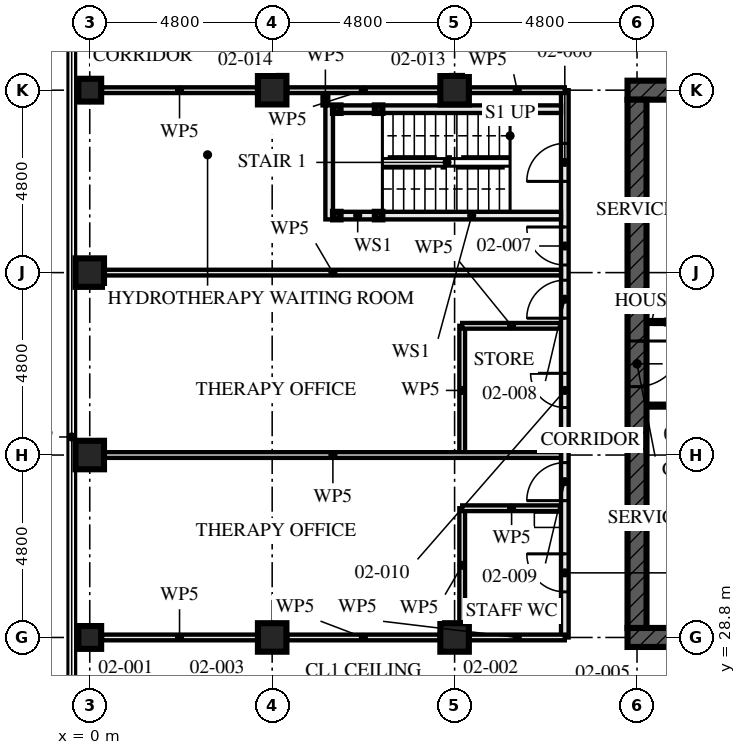
"""IFC4 building model, lengths in metres.
Left out: names, types, materials, properties, quantities, classifications, styles, units other than length and angle.
Written with IfcOpenShell. Run it as: python <this file> out.ifc"""

import sys

from ifc_helpers import new_model, si_unit, direction, frame, frame_2d, origin, origin_2d, place, context, subcontext, project, spatial, rectangle, hollow_rectangle, extrude, element, fill, save


model = new_model("IFC4")
c1 = context("Model", 3, precision=1e-05, world=origin(), true_north=direction((0.0, 1.0)))
c2 = subcontext(c1, "Body", "Model", "MODEL_VIEW")
j1 = project(units=[si_unit("LENGTHUNIT", "METRE"), si_unit("PLANEANGLEUNIT", "RADIAN")], contexts=[c1])
p1 = place(None, origin())
s1 = spatial("IfcSite", under=j1, at=p1, CompositionType="ELEMENT")
p2 = place(p1, origin())
s2 = spatial("IfcBuilding", under=s1, at=p2, CompositionType="ELEMENT")
p3 = place(p2, frame((0.0, 0.0, 9.0)))
s3 = spatial("IfcBuildingStorey", under=s2, at=p3, CompositionType="ELEMENT", Elevation=9.0)
p4 = place(p3, frame((0.0, 28.8, 0.0), z_axis=(0.0, 0.0, 1.0), x_axis=(0.0, 1.0, 0.0)))
e1 = element("IfcColumn", 1, at=p4, inside=s3, PredefinedType="COLUMN", context=c2, shape_type="SweptSolid", body=[
    extrude(hollow_rectangle(XDim=0.6, YDim=0.6, WallThickness=0.08, at=origin_2d()), origin(), (0.0, 0.0, 1.0), 4.5),
])
for number, where, z_axis, x_axis in (
    (2, (0.0, 33.6, 0.0), (0.0, 0.0, 1.0), (1.0, 0.0, 0.0)),
    (3, (0.0, 38.4, 0.0), (0.0, 0.0, 1.0), (1.0, 0.0, 0.0)),
):
    element("IfcColumn", number, at=place(p3, frame(where, z_axis=z_axis, x_axis=x_axis)), inside=s3, PredefinedType="COLUMN", context=c2, shape_type="SweptSolid", body=[
        extrude(hollow_rectangle(XDim=0.75, YDim=0.75, WallThickness=0.08, at=origin_2d()), origin(), (0.0, 0.0, 1.0), 4.5),
    ])
p5 = place(p3, frame((0.0, 43.2, 0.0), z_axis=(0.0, 0.0, 1.0), x_axis=(0.0, 1.0, 0.0)))
e4 = element("IfcColumn", 4, at=p5, inside=s3, PredefinedType="COLUMN", context=c2, shape_type="SweptSolid", body=[
    extrude(hollow_rectangle(XDim=0.6, YDim=0.6, WallThickness=0.08, at=origin_2d()), origin(), (0.0, 0.0, 1.0), 4.5),
])
for number, where, z_axis, x_axis in (
    (5, (4.8, 28.8, 0.0), (0.0, 0.0, 1.0), (0.0, 1.0, 0.0)),
    (6, (4.8, 43.2, 0.0), (0.0, 0.0, 1.0), (0.0, 1.0, 0.0)),
    (7, (9.6, 28.8, 0.0), (0.0, 0.0, 1.0), (0.0, 1.0, 0.0)),
    (8, (9.6, 43.2, 0.0), (0.0, 0.0, 1.0), (0.0, 1.0, 0.0)),
):
    element("IfcColumn", number, at=place(p3, frame(where, z_axis=z_axis, x_axis=x_axis)), inside=s3, PredefinedType="COLUMN", context=c2, shape_type="SweptSolid", body=[
        extrude(hollow_rectangle(XDim=0.75, YDim=0.75, WallThickness=0.08, at=origin_2d()), origin(), (0.0, 0.0, 1.0), 4.5),
    ])
p6 = place(p3, frame((14.15, 28.8, -0.17), z_axis=(0.0, 0.0, 1.0), x_axis=(1.0, 0.0, 0.0)))
e9 = element("IfcWall", 9, at=p6, inside=s3, PredefinedType="SHEAR", context=c2, shape_type="SweptSolid", body=[
    extrude(rectangle(XDim=14.9, YDim=0.5, at=frame_2d((7.45, 0.0))), origin(), (0.0, 0.0, 1.0), 4.5),
])
p7 = place(p6, frame((6.85, 0.0, 0.17)))
e10 = element("IfcOpeningElement", 10, at=p7, cuts=e9, PredefinedType="OPENING", context=c2, shape_type="SweptSolid", body=[
    extrude(rectangle(XDim=1.2, YDim=2.1, at=frame_2d((0.6, 1.05))), frame((0.0, 0.26, 0.0), z_axis=(0.0, -1.0, 0.0), x_axis=(1.0, 0.0, 0.0)), (0.0, 0.0, 1.0), 0.521),
])
p8 = place(p3, frame((29.05, 43.2, -0.17), z_axis=(0.0, 0.0, 1.0), x_axis=(-1.0, 0.0, 0.0)))
e11 = element("IfcWall", 11, at=p8, inside=s3, PredefinedType="SHEAR", context=c2, shape_type="SweptSolid", body=[
    extrude(rectangle(XDim=14.9, YDim=0.5, at=frame_2d((7.45, 0.0))), origin(), (0.0, 0.0, 1.0), 4.5),
])
p9 = place(p8, frame((6.85, 0.0, 0.17)))
e12 = element("IfcOpeningElement", 12, at=p9, cuts=e11, PredefinedType="OPENING", context=c2, shape_type="SweptSolid", body=[
    extrude(rectangle(XDim=1.2, YDim=2.1, at=frame_2d((0.6, 1.05))), frame((0.0, 0.26, 0.0), z_axis=(0.0, -1.0, 0.0), x_axis=(1.0, 0.0, 0.0)), (0.0, 0.0, 1.0), 0.521),
])
p10 = place(p3, frame((14.4, 42.95, -0.17), z_axis=(0.0, 0.0, 1.0), x_axis=(0.0, -1.0, 0.0)))
e13 = element("IfcWall", 13, at=p10, inside=s3, PredefinedType="SHEAR", context=c2, shape_type="SweptSolid", body=[
    extrude(rectangle(XDim=13.9, YDim=0.5, at=frame_2d((6.95, 0.0))), origin(), (0.0, 0.0, 1.0), 4.5),
])
p11 = place(p10, frame((6.35, 0.0, 0.17)))
e14 = element("IfcOpeningElement", 14, at=p11, cuts=e13, PredefinedType="OPENING", context=c2, shape_type="SweptSolid", body=[
    extrude(rectangle(XDim=1.2, YDim=2.1, at=frame_2d((0.6, 1.05))), frame((0.0, 0.26, 0.0), z_axis=(0.0, -1.0, 0.0), x_axis=(1.0, 0.0, 0.0)), (0.0, 0.0, 1.0), 0.521),
])
for number, where, z_axis, x_axis in (
    (15, (6.5, 42.7, 0.0), (0.0, 0.0, 1.0), (1.0, 0.0, 0.0)),
    (16, (6.5, 39.9, 0.0), (0.0, 0.0, 1.0), (1.0, 0.0, 0.0)),
    (17, (7.6, 42.7, 0.0), (0.0, 0.0, 1.0), (1.0, 0.0, 0.0)),
    (18, (7.6, 39.9, 0.0), (0.0, 0.0, 1.0), (1.0, 0.0, 0.0)),
):
    element("IfcColumn", number, at=place(p3, frame(where, z_axis=z_axis, x_axis=x_axis)), inside=s3, PredefinedType="COLUMN", context=c2, shape_type="SweptSolid", body=[
        extrude(hollow_rectangle(XDim=0.2, YDim=0.2, WallThickness=0.008, at=origin_2d()), origin(), (0.0, 0.0, 1.0), 4.33),
    ])
p12 = place(p3, frame((6.6, 42.7, 0.0), z_axis=(0.0, 0.0, 1.0), x_axis=(1.0, 0.0, 0.0)))
e19 = element("IfcWall", 19, at=p12, inside=s3, PredefinedType="SOLIDWALL", context=c2, shape_type="SweptSolid", body=[
    extrude(rectangle(XDim=0.9, YDim=0.2, at=frame_2d((0.45, 0.0))), origin(), (0.0, 0.0, 1.0), 3.99),
])
p13 = place(p3, frame((7.7, 42.7, 0.0), z_axis=(0.0, 0.0, 1.0), x_axis=(1.0, 0.0, 0.0)))
e20 = element("IfcWall", 20, at=p13, inside=s3, PredefinedType="SOLIDWALL", context=c2, shape_type="SweptSolid", body=[
    extrude(rectangle(XDim=4.7, YDim=0.2, at=frame_2d((2.35, 0.0))), origin(), (0.0, 0.0, 1.0), 3.99),
])
p14 = place(p3, frame((6.6, 39.9, 0.0), z_axis=(0.0, 0.0, 1.0), x_axis=(1.0, 0.0, 0.0)))
e21 = element("IfcWall", 21, at=p14, inside=s3, PredefinedType="SOLIDWALL", context=c2, shape_type="SweptSolid", body=[
    extrude(rectangle(XDim=0.9, YDim=0.2, at=frame_2d((0.45, 0.0))), origin(), (0.0, 0.0, 1.0), 3.99),
])
p15 = place(p3, frame((7.7, 39.9, 0.0), z_axis=(0.0, 0.0, 1.0), x_axis=(1.0, 0.0, 0.0)))
e22 = element("IfcWall", 22, at=p15, inside=s3, PredefinedType="SOLIDWALL", context=c2, shape_type="SweptSolid", body=[
    extrude(rectangle(XDim=4.7, YDim=0.2, at=frame_2d((2.35, 0.0))), origin(), (0.0, 0.0, 1.0), 3.99),
])
p16 = place(p3, frame((6.3, 42.8, 0.0), z_axis=(0.0, 0.0, 1.0), x_axis=(0.0, -1.0, 0.0)))
e23 = element("IfcWall", 23, at=p16, inside=s3, PredefinedType="SOLIDWALL", context=c2, shape_type="SweptSolid", body=[
    extrude(rectangle(XDim=3.0, YDim=0.2, at=frame_2d((1.5, 0.0))), origin(), (0.0, 0.0, 1.0), 4.33),
])
p17 = place(p3, frame((9.8, 37.0, 0.0), z_axis=(0.0, 0.0, 1.0), x_axis=(1.0, 0.0, 0.0)))
e24 = element("IfcWall", 24, at=p17, inside=s3, PredefinedType="PARTITIONING", context=c2, shape_type="SweptSolid", body=[
    extrude(rectangle(XDim=2.6, YDim=0.15, at=frame_2d((1.3, 0.0))), origin(), (0.0, 0.0, 1.0), 4.33),
])
p18 = place(p3, frame((9.8, 37.0, 0.0), z_axis=(0.0, 0.0, 1.0), x_axis=(0.0, -1.0, 0.0)))
e25 = element("IfcWall", 25, at=p18, inside=s3, PredefinedType="PARTITIONING", context=c2, shape_type="SweptSolid", body=[
    extrude(rectangle(XDim=3.4, YDim=0.15, at=frame_2d((1.7, 0.0))), origin(), (0.0, 0.0, 1.0), 4.33),
])
p19 = place(p3, frame((9.8, 32.2, 0.0), z_axis=(0.0, 0.0, 1.0), x_axis=(1.0, 0.0, 0.0)))
e26 = element("IfcWall", 26, at=p19, inside=s3, PredefinedType="PARTITIONING", context=c2, shape_type="SweptSolid", body=[
    extrude(rectangle(XDim=2.6, YDim=0.15, at=frame_2d((1.3, 0.0))), origin(), (0.0, 0.0, 1.0), 4.33),
])
p20 = place(p3, frame((9.8, 32.2, 0.0), z_axis=(0.0, 0.0, 1.0), x_axis=(0.0, -1.0, 0.0)))
e27 = element("IfcWall", 27, at=p20, inside=s3, PredefinedType="PARTITIONING", context=c2, shape_type="SweptSolid", body=[
    extrude(rectangle(XDim=3.005, YDim=0.15, at=frame_2d((1.502, 0.0))), origin(), (0.0, 0.0, 1.0), 4.33),
])
for number, where, z_axis, x_axis in (
    (28, (0.395, 38.4, 0.0), (0.0, 0.0, 1.0), (1.0, 0.0, 0.0)),
    (29, (0.395, 33.6, 0.0), (0.0, 0.0, 1.0), (1.0, 0.0, 0.0)),
):
    element("IfcWall", number, at=place(p3, frame(where, z_axis=z_axis, x_axis=x_axis)), inside=s3, PredefinedType="PARTITIONING", context=c2, shape_type="SweptSolid", body=[
        extrude(rectangle(XDim=12.005, YDim=0.15, at=frame_2d((6.002, 0.0))), origin(), (0.0, 0.0, 1.0), 3.55),
    ])
p21 = place(p3, frame((6.2, 43.2, 0.0), z_axis=(0.0, 0.0, 1.0), x_axis=(0.0, -1.0, 0.0)))
e30 = element("IfcWall", 30, at=p21, inside=s3, PredefinedType="PARTITIONING", context=c2, shape_type="SweptSolid", body=[
    extrude(rectangle(XDim=0.4, YDim=0.15, at=frame_2d((0.2, 0.0))), origin(), (0.0, 0.0, 1.0), 4.33),
])
p22 = place(p3, frame((12.5, 43.2, 0.0), z_axis=(0.0, 0.0, 1.0), x_axis=(0.0, -1.0, 0.0)))
e31 = element("IfcWall", 31, at=p22, inside=s3, PredefinedType="PARTITIONING", context=c2, shape_type="SweptSolid", body=[
    extrude(rectangle(XDim=14.4, YDim=0.2, at=frame_2d((7.2, 0.0))), origin(), (0.0, 0.0, 1.0), 3.55),
])
p23 = place(p22, frame((1.4, 0.0, 0.0)))
e32 = element("IfcOpeningElement", 32, at=p23, cuts=e31, PredefinedType="OPENING", context=c2, shape_type="SweptSolid", body=[
    extrude(rectangle(XDim=1.0, YDim=2.1, at=frame_2d((0.5, 1.05))), frame((0.0, 0.111, 0.0), z_axis=(0.0, -1.0, 0.0), x_axis=(1.0, 0.0, 0.0)), (0.0, 0.0, 1.0), 0.221),
])
p24 = place(p22, frame((3.6, 0.0, 0.0)))
e33 = element("IfcOpeningElement", 33, at=p24, cuts=e31, PredefinedType="OPENING", context=c2, shape_type="SweptSolid", body=[
    extrude(rectangle(XDim=1.0, YDim=2.4, at=frame_2d((0.5, 1.2))), frame((0.0, 0.111, 0.0), z_axis=(0.0, -1.0, 0.0), x_axis=(1.0, 0.0, 0.0)), (0.0, 0.0, 1.0), 0.221),
])
p25 = place(p22, frame((5.0, 0.0, 0.0)))
e34 = element("IfcOpeningElement", 34, at=p25, cuts=e31, PredefinedType="OPENING", context=c2, shape_type="SweptSolid", body=[
    extrude(rectangle(XDim=1.0, YDim=2.4, at=frame_2d((0.5, 1.2))), frame((0.0, 0.111, 0.0), z_axis=(0.0, -1.0, 0.0), x_axis=(1.0, 0.0, 0.0)), (0.0, 0.0, 1.0), 0.221),
])
p26 = place(p22, frame((9.8, 0.0, 0.0)))
e35 = element("IfcOpeningElement", 35, at=p26, cuts=e31, PredefinedType="OPENING", context=c2, shape_type="SweptSolid", body=[
    extrude(rectangle(XDim=1.0, YDim=2.4, at=frame_2d((0.5, 1.2))), frame((0.0, 0.111, 0.0), z_axis=(0.0, -1.0, 0.0), x_axis=(1.0, 0.0, 0.0)), (0.0, 0.0, 1.0), 0.221),
])
p27 = place(p22, frame((7.45, 0.0, 0.0)))
e36 = element("IfcOpeningElement", 36, at=p27, cuts=e31, PredefinedType="OPENING", context=c2, shape_type="SweptSolid", body=[
    extrude(rectangle(XDim=0.9, YDim=2.1, at=frame_2d((0.45, 1.05))), frame((0.0, 0.111, 0.0), z_axis=(0.0, -1.0, 0.0), x_axis=(1.0, 0.0, 0.0)), (0.0, 0.0, 1.0), 0.221),
])
p28 = place(p22, frame((12.2, 0.0, 0.0)))
e37 = element("IfcOpeningElement", 37, at=p28, cuts=e31, PredefinedType="OPENING", context=c2, shape_type="SweptSolid", body=[
    extrude(rectangle(XDim=1.0, YDim=2.1, at=frame_2d((0.5, 1.05))), frame((0.0, 0.111, 0.0), z_axis=(0.0, -1.0, 0.0), x_axis=(1.0, 0.0, 0.0)), (0.0, 0.0, 1.0), 0.221),
])
p29 = place(p3, frame((14.65, 34.9, 0.0), z_axis=(0.0, 0.0, 1.0), x_axis=(1.0, 0.0, 0.0)))
e38 = element("IfcWall", 38, at=p29, inside=s3, PredefinedType="SOLIDWALL", context=c2, shape_type="SweptSolid", body=[
    extrude(rectangle(XDim=5.9, YDim=0.1, at=frame_2d((2.95, 0.0))), origin(), (0.0, 0.0, 1.0), 4.33),
])
p30 = place(p29, frame((1.6, 0.0, 0.0)))
e39 = element("IfcOpeningElement", 39, at=p30, cuts=e38, PredefinedType="OPENING", context=c2, shape_type="SweptSolid", body=[
    extrude(rectangle(XDim=0.7, YDim=2.1, at=frame_2d((0.35, 1.05))), frame((0.0, 0.061, 0.0), z_axis=(0.0, -1.0, 0.0), x_axis=(1.0, 0.0, 0.0)), (0.0, 0.0, 1.0), 0.121),
])
p31 = place(p3, frame((14.65, 37.1, 0.0), z_axis=(0.0, 0.0, 1.0), x_axis=(1.0, 0.0, 0.0)))
e40 = element("IfcWall", 40, at=p31, inside=s3, PredefinedType="SOLIDWALL", context=c2, shape_type="SweptSolid", body=[
    extrude(rectangle(XDim=5.9, YDim=0.1, at=frame_2d((2.95, 0.0))), origin(), (0.0, 0.0, 1.0), 4.33),
])
p32 = place(p31, frame((0.15, 0.0, 0.0)))
e41 = element("IfcOpeningElement", 41, at=p32, cuts=e40, PredefinedType="OPENING", context=c2, shape_type="SweptSolid", body=[
    extrude(rectangle(XDim=0.7, YDim=2.1, at=frame_2d((0.35, 1.05))), frame((0.0, 0.061, 0.0), z_axis=(0.0, -1.0, 0.0), x_axis=(1.0, 0.0, 0.0)), (0.0, 0.0, 1.0), 0.121),
])
p33 = place(p31, frame((1.5, 0.0, 0.0)))
e42 = element("IfcOpeningElement", 42, at=p33, cuts=e40, PredefinedType="OPENING", context=c2, shape_type="SweptSolid", body=[
    extrude(rectangle(XDim=0.9, YDim=2.1, at=frame_2d((0.45, 1.05))), frame((0.0, 0.061, 0.0), z_axis=(0.0, -1.0, 0.0), x_axis=(1.0, 0.0, 0.0)), (0.0, 0.0, 1.0), 0.121),
])
p34 = place(p3, frame((12.5, 28.8, 0.0), z_axis=(0.0, 0.0, 1.0), x_axis=(-1.0, 0.0, 0.0)))
e43 = element("IfcWall", 43, at=p34, inside=s3, PredefinedType="PARTITIONING", context=c2, shape_type="SweptSolid", body=[
    extrude(rectangle(XDim=2.505, YDim=0.15, at=frame_2d((1.252, 0.0))), origin(), (0.0, 0.0, 1.0), 3.32),
])
p35 = place(p3, frame((9.205, 28.8, 0.0), z_axis=(0.0, 0.0, 1.0), x_axis=(-1.0, 0.0, 0.0)))
e44 = element("IfcWall", 44, at=p35, inside=s3, PredefinedType="PARTITIONING", context=c2, shape_type="SweptSolid", body=[
    extrude(rectangle(XDim=4.01, YDim=0.15, at=frame_2d((2.005, 0.0))), origin(), (0.0, 0.0, 1.0), 3.32),
])
p36 = place(p3, frame((4.405, 28.8, 0.0), z_axis=(0.0, 0.0, 1.0), x_axis=(-1.0, 0.0, 0.0)))
e45 = element("IfcWall", 45, at=p36, inside=s3, PredefinedType="PARTITIONING", context=c2, shape_type="SweptSolid", body=[
    extrude(rectangle(XDim=4.085, YDim=0.15, at=frame_2d((2.042, 0.0))), origin(), (0.0, 0.0, 1.0), 3.32),
])
p37 = place(p3, frame((12.5, 43.2, 0.0), z_axis=(0.0, 0.0, 1.0), x_axis=(-1.0, 0.0, 0.0)))
e46 = element("IfcWall", 46, at=p37, inside=s3, PredefinedType="PARTITIONING", context=c2, shape_type="SweptSolid", body=[
    extrude(rectangle(XDim=2.505, YDim=0.15, at=frame_2d((1.252, 0.0))), origin(), (0.0, 0.0, 1.0), 3.32),
])
p38 = place(p3, frame((9.205, 43.2, 0.0), z_axis=(0.0, 0.0, 1.0), x_axis=(-1.0, 0.0, 0.0)))
e47 = element("IfcWall", 47, at=p38, inside=s3, PredefinedType="PARTITIONING", context=c2, shape_type="SweptSolid", body=[
    extrude(rectangle(XDim=4.01, YDim=0.15, at=frame_2d((2.005, 0.0))), origin(), (0.0, 0.0, 1.0), 3.32),
])
p39 = place(p3, frame((4.405, 43.2, 0.0), z_axis=(0.0, 0.0, 1.0), x_axis=(-1.0, 0.0, 0.0)))
e48 = element("IfcWall", 48, at=p39, inside=s3, PredefinedType="PARTITIONING", context=c2, shape_type="SweptSolid", body=[
    extrude(rectangle(XDim=4.085, YDim=0.15, at=frame_2d((2.042, 0.0))), origin(), (0.0, 0.0, 1.0), 3.32),
])
p40 = place(p23, frame((1.0, 0.0, 0.0), z_axis=(0.0, 0.0, 1.0), x_axis=(-1.0, 0.0, 0.0)))
e49 = element("IfcDoor", 49, at=p40, inside=s3, OperationType="SINGLE_SWING_RIGHT", PredefinedType="DOOR", context=c2, shape_type="SweptSolid", body=[
    extrude(rectangle(XDim=1.0, YDim=2.1, at=frame_2d((0.5, 1.05))), frame((0.0, 0.032, 0.0), z_axis=(0.0, -1.0, 0.0), x_axis=(1.0, 0.0, 0.0)), (0.0, 0.0, 1.0), 0.064),
])
fill(e32, e49)
p41 = place(p24, frame((1.0, 0.0, 0.0), z_axis=(0.0, 0.0, 1.0), x_axis=(-1.0, 0.0, 0.0)))
e50 = element("IfcDoor", 50, at=p41, inside=s3, OperationType="SINGLE_SWING_LEFT", PredefinedType="DOOR", context=c2, shape_type="SweptSolid", body=[
    extrude(rectangle(XDim=1.0, YDim=2.4, at=frame_2d((0.5, 1.2))), frame((0.0, 0.027, 0.0), z_axis=(0.0, -1.0, 0.0), x_axis=(1.0, 0.0, 0.0)), (0.0, 0.0, 1.0), 0.054),
])
fill(e33, e50)
p42 = place(p25, frame((1.0, 0.0, 0.0), z_axis=(0.0, 0.0, 1.0), x_axis=(-1.0, 0.0, 0.0)))
e51 = element("IfcDoor", 51, at=p42, inside=s3, OperationType="SINGLE_SWING_RIGHT", PredefinedType="DOOR", context=c2, shape_type="SweptSolid", body=[
    extrude(rectangle(XDim=1.0, YDim=2.4, at=frame_2d((0.5, 1.2))), frame((0.0, 0.027, 0.0), z_axis=(0.0, -1.0, 0.0), x_axis=(1.0, 0.0, 0.0)), (0.0, 0.0, 1.0), 0.054),
])
fill(e34, e51)
p43 = place(p26, frame((1.0, 0.0, 0.0), z_axis=(0.0, 0.0, 1.0), x_axis=(-1.0, 0.0, 0.0)))
e52 = element("IfcDoor", 52, at=p43, inside=s3, OperationType="SINGLE_SWING_RIGHT", PredefinedType="DOOR", context=c2, shape_type="SweptSolid", body=[
    extrude(rectangle(XDim=1.0, YDim=2.4, at=frame_2d((0.5, 1.2))), frame((0.0, 0.027, 0.0), z_axis=(0.0, -1.0, 0.0), x_axis=(1.0, 0.0, 0.0)), (0.0, 0.0, 1.0), 0.054),
])
fill(e35, e52)
p44 = place(p27, frame((0.9, 0.0, 0.0), z_axis=(0.0, 0.0, 1.0), x_axis=(-1.0, 0.0, 0.0)))
e53 = element("IfcDoor", 53, at=p44, inside=s3, OperationType="SINGLE_SWING_LEFT", PredefinedType="DOOR", context=c2, shape_type="SweptSolid", body=[
    extrude(rectangle(XDim=0.9, YDim=2.1, at=frame_2d((0.45, 1.05))), frame((0.0, 0.027, 0.0), z_axis=(0.0, -1.0, 0.0), x_axis=(1.0, 0.0, 0.0)), (0.0, 0.0, 1.0), 0.054),
])
fill(e36, e53)
p45 = place(p28, frame((1.0, 0.0, 0.0), z_axis=(0.0, 0.0, 1.0), x_axis=(-1.0, 0.0, 0.0)))
e54 = element("IfcDoor", 54, at=p45, inside=s3, OperationType="SINGLE_SWING_LEFT", PredefinedType="DOOR", context=c2, shape_type="SweptSolid", body=[
    extrude(rectangle(XDim=1.0, YDim=2.1, at=frame_2d((0.5, 1.05))), frame((0.0, 0.027, 0.0), z_axis=(0.0, -1.0, 0.0), x_axis=(1.0, 0.0, 0.0)), (0.0, 0.0, 1.0), 0.054),
])
fill(e37, e54)
p46 = place(p32, origin())
e55 = element("IfcDoor", 55, at=p46, inside=s3, OperationType="SINGLE_SWING_LEFT", PredefinedType="DOOR", context=c2, shape_type="SweptSolid", body=[
    extrude(rectangle(XDim=0.7, YDim=2.1, at=frame_2d((0.35, 1.05))), frame((0.0, 0.027, 0.0), z_axis=(0.0, -1.0, 0.0), x_axis=(1.0, 0.0, 0.0)), (0.0, 0.0, 1.0), 0.054),
])
fill(e41, e55)
p47 = place(p11, origin())
e56 = element("IfcDoor", 56, at=p47, inside=s3, OperationType="SINGLE_SWING_LEFT", PredefinedType="DOOR", context=c2, shape_type="SweptSolid", body=[
    extrude(rectangle(XDim=1.2, YDim=2.1, at=frame_2d((0.6, 1.05))), frame((0.0, 0.027, 0.0), z_axis=(0.0, -1.0, 0.0), x_axis=(1.0, 0.0, 0.0)), (0.0, 0.0, 1.0), 0.054),
])
fill(e14, e56)
save(model, sys.argv[1])
